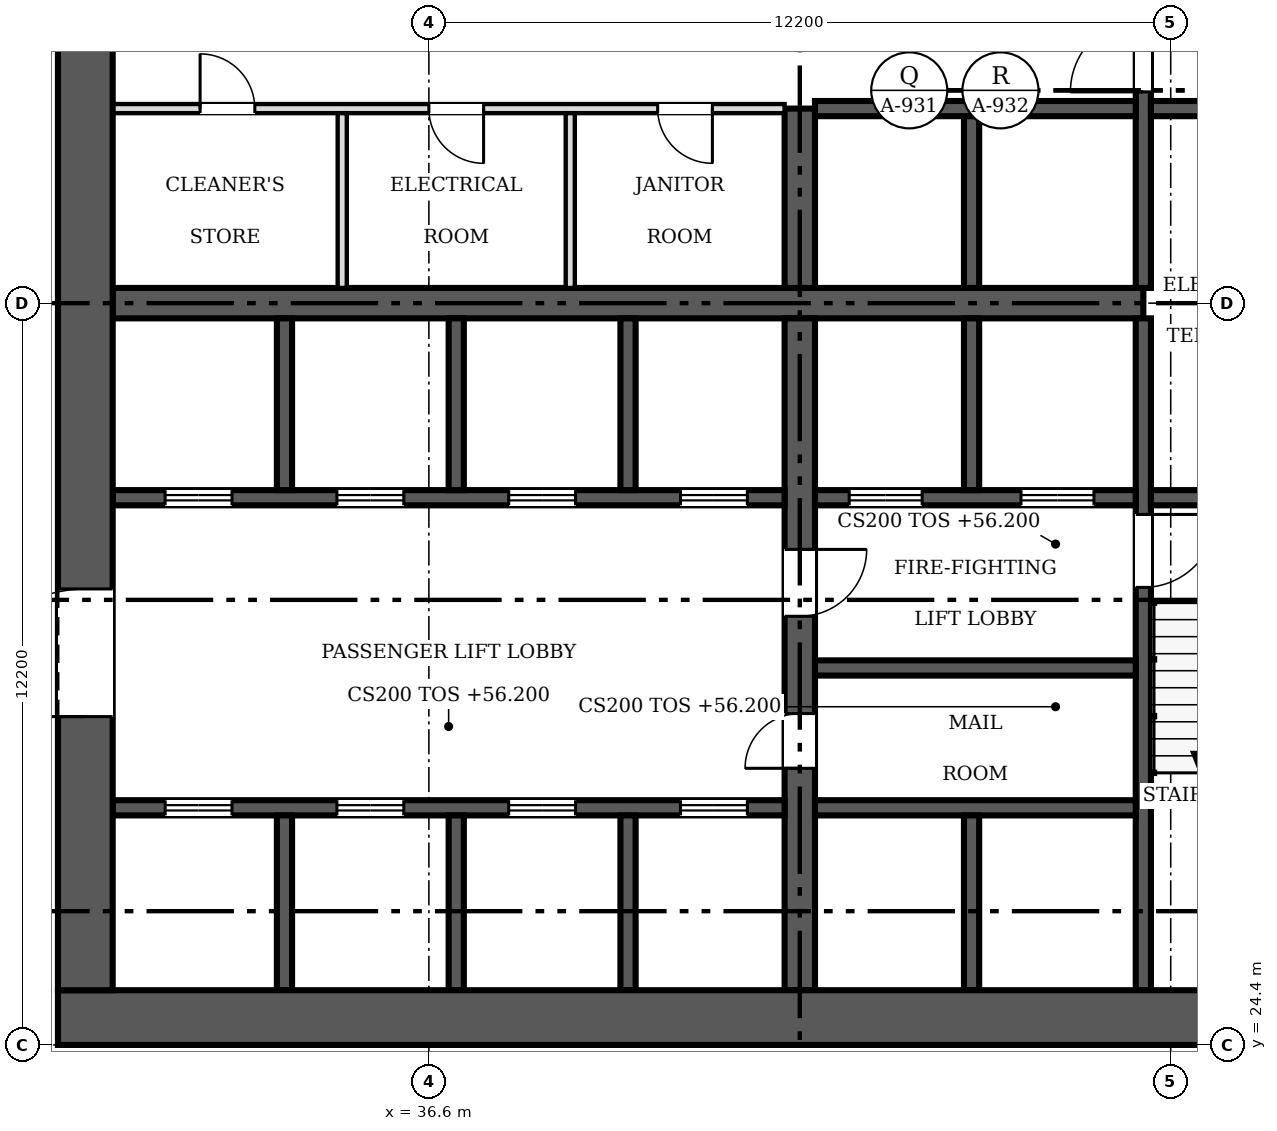
"""IFC4 building model, lengths in metres.
Left out: names, types, materials, properties, quantities, classifications, styles, units other than length and angle.
Written with IfcOpenShell. Run it as: python <this file> out.ifc"""

import sys

from ifc_helpers import new_model, si_unit, direction, frame, frame_2d, origin, place, context, subcontext, project, spatial, rectangle, extrude, source, transform, mapped, element, fill, save


model = new_model("IFC4")
c1 = context("Model", 3, precision=1e-05, world=origin(), true_north=direction((0.0, 1.0)))
c2 = subcontext(c1, "Body", "Model", "MODEL_VIEW")
j1 = project(units=[si_unit("LENGTHUNIT", "METRE"), si_unit("PLANEANGLEUNIT", "RADIAN")], contexts=[c1])
p1 = place(None, origin())
s1 = spatial("IfcSite", under=j1, at=p1, CompositionType="ELEMENT")
p2 = place(p1, origin())
s2 = spatial("IfcBuilding", under=s1, at=p2, CompositionType="ELEMENT")
p3 = place(p2, frame((0.0, 0.0, 56.2)))
s3 = spatial("IfcBuildingStorey", under=s2, at=p3, CompositionType="ELEMENT", Elevation=56.2)
p4 = place(p3, frame((54.9, 24.85, 0.0), z_axis=(0.0, 0.0, 1.0), x_axis=(-1.0, 0.0, 0.0)))
e1 = element("IfcWall", 1, at=p4, inside=s3, PredefinedType="SHEAR", context=c2, shape_type="SweptSolid", body=[
    extrude(rectangle(XDim=24.4, YDim=0.9, at=frame_2d((12.2, 0.0))), origin(), (0.0, 0.0, 1.0), 3.8),
])
m1 = source(origin(), c2, "Body", "SweptSolid", [
    extrude(rectangle(XDim=1.2, YDim=2.1, at=frame_2d((0.6, 1.05))), frame((0.0, 0.46, 0.0), z_axis=(0.0, -1.0, 0.0), x_axis=(1.0, 0.0, 0.0)), (0.0, 0.0, 1.0), 0.92),
])
p5 = place(p4, frame((1.5, 0.0, 0.0)))
e2 = element("IfcOpeningElement", 2, at=p5, cuts=e1, PredefinedType="OPENING", context=c2, shape_type="MappedRepresentation", body=[
    mapped(m1, transform((0.0, 0.0, 0.0), scale=1.0)),
])
p6 = place(p3, frame((30.95, 25.3, 0.0), z_axis=(0.0, 0.0, 1.0), x_axis=(0.0, 1.0, 0.0)))
e3 = element("IfcWall", 3, at=p6, inside=s3, PredefinedType="SHEAR", context=c2, shape_type="SweptSolid", body=[
    extrude(rectangle(XDim=22.6, YDim=0.9, at=frame_2d((11.3, 0.0))), origin(), (0.0, 0.0, 1.0), 3.8),
])
m2 = source(origin(), c2, "Body", "SweptSolid", [
    extrude(rectangle(XDim=2.1, YDim=2.4, at=frame_2d((1.05, 1.2))), frame((0.0, 0.46, 0.0), z_axis=(0.0, -1.0, 0.0), x_axis=(1.0, 0.0, 0.0)), (0.0, 0.0, 1.0), 0.92),
])
p7 = place(p6, frame((4.5, 0.0, 0.0)))
e4 = element("IfcOpeningElement", 4, at=p7, cuts=e3, PredefinedType="OPENING", context=c2, shape_type="MappedRepresentation", body=[
    mapped(m2, transform((0.0, 0.0, 0.0), scale=1.0)),
])
p8 = place(p6, frame((16.0, 0.0, 0.0)))
e5 = element("IfcOpeningElement", 5, at=p8, cuts=e3, PredefinedType="OPENING", context=c2, shape_type="MappedRepresentation", body=[
    mapped(m2, transform((0.0, 0.0, 0.0), scale=1.0)),
])
p9 = place(p3, frame((31.4, 36.6, 0.0), z_axis=(0.0, 0.0, 1.0), x_axis=(1.0, 0.0, 0.0)))
e6 = element("IfcWall", 6, at=p9, inside=s3, PredefinedType="SHEAR", context=c2, shape_type="SweptSolid", body=[
    extrude(rectangle(XDim=16.95, YDim=0.5, at=frame_2d((8.475, 0.0))), origin(), (0.0, 0.0, 1.0), 3.8),
])
p10 = place(p3, frame((42.7, 36.35, 0.0), z_axis=(0.0, 0.0, 1.0), x_axis=(0.0, -1.0, 0.0)))
e7 = element("IfcWall", 7, at=p10, inside=s3, PredefinedType="SHEAR", context=c2, shape_type="SweptSolid", body=[
    extrude(rectangle(XDim=11.05, YDim=0.5, at=frame_2d((5.525, 0.0))), origin(), (0.0, 0.0, 1.0), 3.8),
])
m3 = source(origin(), c2, "Body", "SweptSolid", [
    extrude(rectangle(XDim=0.9, YDim=2.1, at=frame_2d((0.45, 1.05))), frame((0.0, 0.26, 0.0), z_axis=(0.0, -1.0, 0.0), x_axis=(1.0, 0.0, 0.0)), (0.0, 0.0, 1.0), 0.52),
])
p11 = place(p10, frame((6.5, 0.0, 0.0)))
e8 = element("IfcOpeningElement", 8, at=p11, cuts=e7, PredefinedType="OPENING", context=c2, shape_type="MappedRepresentation", body=[
    mapped(m3, transform((0.0, 0.0, 0.0), scale=1.0)),
])
m4 = source(origin(), c2, "Body", "SweptSolid", [
    extrude(rectangle(XDim=1.1, YDim=2.1, at=frame_2d((0.55, 1.05))), frame((0.0, 0.26, 0.0), z_axis=(0.0, -1.0, 0.0), x_axis=(1.0, 0.0, 0.0)), (0.0, 0.0, 1.0), 0.52),
])
p12 = place(p10, frame((3.8, 0.0, 0.0)))
e9 = element("IfcOpeningElement", 9, at=p12, cuts=e7, PredefinedType="OPENING", context=c2, shape_type="MappedRepresentation", body=[
    mapped(m4, transform((0.0, 0.0, 0.0), scale=1.0)),
])
p13 = place(p3, frame((42.7, 36.85, 0.0), z_axis=(0.0, 0.0, 1.0), x_axis=(0.0, 1.0, 0.0)))
e10 = element("IfcWall", 10, at=p13, inside=s3, PredefinedType="SHEAR", context=c2, shape_type="SweptSolid", body=[
    extrude(rectangle(XDim=2.95, YDim=0.5, at=frame_2d((1.475, 0.0))), origin(), (0.0, 0.0, 1.0), 3.8),
])
p14 = place(p3, frame((48.35, 36.35, 0.0), z_axis=(0.0, 0.0, 1.0), x_axis=(0.0, -1.0, 0.0)))
e11 = element("IfcWall", 11, at=p14, inside=s3, PredefinedType="SOLIDWALL", context=c2, shape_type="SweptSolid", body=[
    extrude(rectangle(XDim=11.05, YDim=0.25, at=frame_2d((5.525, 0.0))), origin(), (0.0, 0.0, 1.0), 3.8),
])
m5 = source(origin(), c2, "Body", "SweptSolid", [
    extrude(rectangle(XDim=1.2, YDim=2.1, at=frame_2d((0.6, 1.05))), frame((0.0, 0.135, 0.0), z_axis=(0.0, -1.0, 0.0), x_axis=(1.0, 0.0, 0.0)), (0.0, 0.0, 1.0), 0.27),
])
p15 = place(p14, frame((3.225, 0.0, 0.0)))
e12 = element("IfcOpeningElement", 12, at=p15, cuts=e11, PredefinedType="OPENING", context=c2, shape_type="MappedRepresentation", body=[
    mapped(m5, transform((0.0, 0.0, 0.0), scale=1.0)),
])
p16 = place(p3, frame((48.35, 47.9, 0.0), z_axis=(0.0, 0.0, 1.0), x_axis=(0.0, -1.0, 0.0)))
e13 = element("IfcWall", 13, at=p16, inside=s3, PredefinedType="SOLIDWALL", context=c2, shape_type="SweptSolid", body=[
    extrude(rectangle(XDim=11.05, YDim=0.25, at=frame_2d((5.525, 0.0))), origin(), (0.0, 0.0, 1.0), 3.8),
])
p17 = place(p16, frame((6.625, 0.0, 0.0)))
e14 = element("IfcOpeningElement", 14, at=p17, cuts=e13, PredefinedType="OPENING", context=c2, shape_type="MappedRepresentation", body=[
    mapped(m5, transform((0.0, 0.0, 0.0), scale=1.0)),
])
p18 = place(p3, frame((42.45, 33.4, 0.0), z_axis=(0.0, 0.0, 1.0), x_axis=(-1.0, 0.0, 0.0)))
e15 = element("IfcWall", 15, at=p18, inside=s3, PredefinedType="SOLIDWALL", context=c2, shape_type="SweptSolid", body=[
    extrude(rectangle(XDim=11.05, YDim=0.25, at=frame_2d((5.525, 0.0))), origin(), (0.0, 0.0, 1.0), 3.8),
])
m6 = source(origin(), c2, "Body", "SweptSolid", [
    extrude(rectangle(XDim=1.1, YDim=2.1, at=frame_2d((0.55, 1.05))), frame((0.0, 0.135, 0.0), z_axis=(0.0, -1.0, 0.0), x_axis=(1.0, 0.0, 0.0)), (0.0, 0.0, 1.0), 0.27),
])
p19 = place(p18, frame((9.087, 0.0, 0.0)))
e16 = element("IfcOpeningElement", 16, at=p19, cuts=e15, PredefinedType="OPENING", context=c2, shape_type="MappedRepresentation", body=[
    mapped(m6, transform((0.0, 0.0, 0.0), scale=1.0)),
])
p20 = place(p18, frame((6.262, 0.0, 0.0)))
e17 = element("IfcOpeningElement", 17, at=p20, cuts=e15, PredefinedType="OPENING", context=c2, shape_type="MappedRepresentation", body=[
    mapped(m6, transform((0.0, 0.0, 0.0), scale=1.0)),
])
p21 = place(p18, frame((3.438, 0.0, 0.0)))
e18 = element("IfcOpeningElement", 18, at=p21, cuts=e15, PredefinedType="OPENING", context=c2, shape_type="MappedRepresentation", body=[
    mapped(m6, transform((0.0, 0.0, 0.0), scale=1.0)),
])
p22 = place(p18, frame((0.613, 0.0, 0.0)))
e19 = element("IfcOpeningElement", 19, at=p22, cuts=e15, PredefinedType="OPENING", context=c2, shape_type="MappedRepresentation", body=[
    mapped(m6, transform((0.0, 0.0, 0.0), scale=1.0)),
])
p23 = place(p3, frame((48.225, 33.4, 0.0), z_axis=(0.0, 0.0, 1.0), x_axis=(-1.0, 0.0, 0.0)))
e20 = element("IfcWall", 20, at=p23, inside=s3, PredefinedType="SOLIDWALL", context=c2, shape_type="SweptSolid", body=[
    extrude(rectangle(XDim=5.275, YDim=0.25, at=frame_2d((2.638, 0.0))), origin(), (0.0, 0.0, 1.0), 3.8),
])
p24 = place(p23, frame((3.512, 0.0, 0.0)))
e21 = element("IfcOpeningElement", 21, at=p24, cuts=e20, PredefinedType="OPENING", context=c2, shape_type="MappedRepresentation", body=[
    mapped(m5, transform((0.0, 0.0, 0.0), scale=1.0)),
])
p25 = place(p23, frame((0.688, 0.0, 0.0)))
e22 = element("IfcOpeningElement", 22, at=p25, cuts=e20, PredefinedType="OPENING", context=c2, shape_type="MappedRepresentation", body=[
    mapped(m5, transform((0.0, 0.0, 0.0), scale=1.0)),
])
p26 = place(p3, frame((48.475, 33.4, 0.0), z_axis=(0.0, 0.0, 1.0), x_axis=(1.0, 0.0, 0.0)))
e23 = element("IfcWall", 23, at=p26, inside=s3, PredefinedType="SOLIDWALL", context=c2, shape_type="SweptSolid", body=[
    extrude(rectangle(XDim=3.525, YDim=0.25, at=frame_2d((1.762, 0.0))), origin(), (0.0, 0.0, 1.0), 3.8),
])
p27 = place(p3, frame((31.4, 28.3, 0.0), z_axis=(0.0, 0.0, 1.0), x_axis=(1.0, 0.0, 0.0)))
e24 = element("IfcWall", 24, at=p27, inside=s3, PredefinedType="SOLIDWALL", context=c2, shape_type="SweptSolid", body=[
    extrude(rectangle(XDim=11.05, YDim=0.25, at=frame_2d((5.525, 0.0))), origin(), (0.0, 0.0, 1.0), 3.8),
])
p28 = place(p27, frame((0.863, 0.0, 0.0)))
e25 = element("IfcOpeningElement", 25, at=p28, cuts=e24, PredefinedType="OPENING", context=c2, shape_type="MappedRepresentation", body=[
    mapped(m6, transform((0.0, 0.0, 0.0), scale=1.0)),
])
p29 = place(p27, frame((3.688, 0.0, 0.0)))
e26 = element("IfcOpeningElement", 26, at=p29, cuts=e24, PredefinedType="OPENING", context=c2, shape_type="MappedRepresentation", body=[
    mapped(m6, transform((0.0, 0.0, 0.0), scale=1.0)),
])
p30 = place(p27, frame((6.512, 0.0, 0.0)))
e27 = element("IfcOpeningElement", 27, at=p30, cuts=e24, PredefinedType="OPENING", context=c2, shape_type="MappedRepresentation", body=[
    mapped(m6, transform((0.0, 0.0, 0.0), scale=1.0)),
])
p31 = place(p27, frame((9.337, 0.0, 0.0)))
e28 = element("IfcOpeningElement", 28, at=p31, cuts=e24, PredefinedType="OPENING", context=c2, shape_type="MappedRepresentation", body=[
    mapped(m6, transform((0.0, 0.0, 0.0), scale=1.0)),
])
for number, where, z_axis, x_axis in (
    (29, (42.95, 28.3, 0.0), (0.0, 0.0, 1.0), (1.0, 0.0, 0.0)),
    (30, (42.95, 39.8, 0.0), (0.0, 0.0, 1.0), (1.0, 0.0, 0.0)),
):
    element("IfcWall", number, at=place(p3, frame(where, z_axis=z_axis, x_axis=x_axis)), inside=s3, PredefinedType="SOLIDWALL", context=c2, shape_type="SweptSolid", body=[
        extrude(rectangle(XDim=5.275, YDim=0.25, at=frame_2d((2.638, 0.0))), origin(), (0.0, 0.0, 1.0), 3.8),
    ])
p32 = place(p3, frame((48.475, 39.8, 0.0), z_axis=(0.0, 0.0, 1.0), x_axis=(1.0, 0.0, 0.0)))
e31 = element("IfcWall", 31, at=p32, inside=s3, PredefinedType="SOLIDWALL", context=c2, shape_type="SweptSolid", body=[
    extrude(rectangle(XDim=3.525, YDim=0.25, at=frame_2d((1.762, 0.0))), origin(), (0.0, 0.0, 1.0), 3.8),
])
p33 = place(p3, frame((45.525, 33.525, 0.0), z_axis=(0.0, 0.0, 1.0), x_axis=(0.0, 1.0, 0.0)))
e32 = element("IfcWall", 32, at=p33, inside=s3, PredefinedType="SOLIDWALL", context=c2, shape_type="SweptSolid", body=[
    extrude(rectangle(XDim=2.825, YDim=0.25, at=frame_2d((1.413, 0.0))), origin(), (0.0, 0.0, 1.0), 3.8),
])
p34 = place(p3, frame((45.525, 36.85, 0.0), z_axis=(0.0, 0.0, 1.0), x_axis=(0.0, 1.0, 0.0)))
e33 = element("IfcWall", 33, at=p34, inside=s3, PredefinedType="SOLIDWALL", context=c2, shape_type="SweptSolid", body=[
    extrude(rectangle(XDim=2.825, YDim=0.25, at=frame_2d((1.413, 0.0))), origin(), (0.0, 0.0, 1.0), 3.8),
])
p35 = place(p3, frame((42.95, 30.6, 0.0), z_axis=(0.0, 0.0, 1.0), x_axis=(1.0, 0.0, 0.0)))
e34 = element("IfcWall", 34, at=p35, inside=s3, PredefinedType="SOLIDWALL", context=c2, shape_type="SweptSolid", body=[
    extrude(rectangle(XDim=5.275, YDim=0.25, at=frame_2d((2.638, 0.0))), origin(), (0.0, 0.0, 1.0), 3.8),
])
for number, where, z_axis, x_axis in (
    (35, (34.225, 33.525, 0.0), (0.0, 0.0, 1.0), (0.0, 1.0, 0.0)),
    (36, (37.05, 33.525, 0.0), (0.0, 0.0, 1.0), (0.0, 1.0, 0.0)),
    (37, (39.875, 33.525, 0.0), (0.0, 0.0, 1.0), (0.0, 1.0, 0.0)),
):
    element("IfcWall", number, at=place(p3, frame(where, z_axis=z_axis, x_axis=x_axis)), inside=s3, PredefinedType="SOLIDWALL", context=c2, shape_type="SweptSolid", body=[
        extrude(rectangle(XDim=2.825, YDim=0.25, at=frame_2d((1.413, 0.0))), origin(), (0.0, 0.0, 1.0), 3.8),
    ])
for number, where, z_axis, x_axis in (
    (38, (34.225, 25.3, 0.0), (0.0, 0.0, 1.0), (0.0, 1.0, 0.0)),
    (39, (37.05, 25.3, 0.0), (0.0, 0.0, 1.0), (0.0, 1.0, 0.0)),
    (40, (39.875, 25.3, 0.0), (0.0, 0.0, 1.0), (0.0, 1.0, 0.0)),
    (41, (45.525, 25.3, 0.0), (0.0, 0.0, 1.0), (0.0, 1.0, 0.0)),
):
    element("IfcWall", number, at=place(p3, frame(where, z_axis=z_axis, x_axis=x_axis)), inside=s3, PredefinedType="SOLIDWALL", context=c2, shape_type="SweptSolid", body=[
        extrude(rectangle(XDim=2.875, YDim=0.25, at=frame_2d((1.438, 0.0))), origin(), (0.0, 0.0, 1.0), 3.8),
    ])
p36 = place(p3, frame((42.45, 39.8, 0.0), z_axis=(0.0, 0.0, 1.0), x_axis=(-1.0, 0.0, 0.0)))
e42 = element("IfcWall", 42, at=p36, inside=s3, PredefinedType="PARTITIONING", context=c2, shape_type="SweptSolid", body=[
    extrude(rectangle(XDim=11.05, YDim=0.15, at=frame_2d((5.525, 0.0))), origin(), (0.0, 0.0, 1.0), 3.6),
])
m7 = source(origin(), c2, "Body", "SweptSolid", [
    extrude(rectangle(XDim=0.9, YDim=2.1, at=frame_2d((0.45, 1.05))), frame((0.0, 0.085, 0.0), z_axis=(0.0, -1.0, 0.0), x_axis=(1.0, 0.0, 0.0)), (0.0, 0.0, 1.0), 0.17),
])
p37 = place(p36, frame((8.712, 0.0, 0.0)))
e43 = element("IfcOpeningElement", 43, at=p37, cuts=e42, PredefinedType="OPENING", context=c2, shape_type="MappedRepresentation", body=[
    mapped(m7, transform((0.0, 0.0, 0.0), scale=1.0)),
])
p38 = place(p36, frame((4.95, 0.0, 0.0)))
e44 = element("IfcOpeningElement", 44, at=p38, cuts=e42, PredefinedType="OPENING", context=c2, shape_type="MappedRepresentation", body=[
    mapped(m7, transform((0.0, 0.0, 0.0), scale=1.0)),
])
p39 = place(p36, frame((1.188, 0.0, 0.0)))
e45 = element("IfcOpeningElement", 45, at=p39, cuts=e42, PredefinedType="OPENING", context=c2, shape_type="MappedRepresentation", body=[
    mapped(m7, transform((0.0, 0.0, 0.0), scale=1.0)),
])
for number, where, z_axis, x_axis in (
    (46, (35.175, 36.85, 0.0), (0.0, 0.0, 1.0), (0.0, 1.0, 0.0)),
    (47, (38.925, 36.85, 0.0), (0.0, 0.0, 1.0), (0.0, 1.0, 0.0)),
):
    element("IfcWall", number, at=place(p3, frame(where, z_axis=z_axis, x_axis=x_axis)), inside=s3, PredefinedType="PARTITIONING", context=c2, shape_type="SweptSolid", body=[
        extrude(rectangle(XDim=2.875, YDim=0.15, at=frame_2d((1.438, 0.0))), origin(), (0.0, 0.0, 1.0), 3.6),
    ])
m8 = source(origin(), c2, "Body", "SweptSolid", [
    extrude(rectangle(XDim=2.1, YDim=2.4, at=frame_2d((1.05, 1.2))), frame((0.0, 0.025, 0.0), z_axis=(0.0, -1.0, 0.0), x_axis=(1.0, 0.0, 0.0)), (0.0, 0.0, 1.0), 0.05),
])
p40 = place(p7, origin())
e48 = element("IfcDoor", 48, at=p40, inside=s3, OperationType="DOUBLE_DOOR_SINGLE_SWING", PredefinedType="DOOR", context=c2, shape_type="MappedRepresentation", body=[
    mapped(m8, transform((0.0, 0.0, 0.0), scale=1.0)),
])
fill(e4, e48)
m9 = source(origin(), c2, "Body", "SweptSolid", [
    extrude(rectangle(XDim=0.9, YDim=2.1, at=frame_2d((0.45, 1.05))), frame((0.0, 0.025, 0.0), z_axis=(0.0, -1.0, 0.0), x_axis=(1.0, 0.0, 0.0)), (0.0, 0.0, 1.0), 0.05),
])
p41 = place(p11, origin())
e49 = element("IfcDoor", 49, at=p41, inside=s3, OperationType="SINGLE_SWING_RIGHT", PredefinedType="DOOR", context=c2, shape_type="MappedRepresentation", body=[
    mapped(m9, transform((0.0, 0.0, 0.0), scale=1.0)),
])
fill(e8, e49)
m10 = source(origin(), c2, "Body", "SweptSolid", [
    extrude(rectangle(XDim=1.1, YDim=2.1, at=frame_2d((0.55, 1.05))), frame((0.0, 0.025, 0.0), z_axis=(0.0, -1.0, 0.0), x_axis=(1.0, 0.0, 0.0)), (0.0, 0.0, 1.0), 0.05),
])
p42 = place(p12, origin())
e50 = element("IfcDoor", 50, at=p42, inside=s3, OperationType="SINGLE_SWING_LEFT", PredefinedType="DOOR", context=c2, shape_type="MappedRepresentation", body=[
    mapped(m10, transform((0.0, 0.0, 0.0), scale=1.0)),
])
fill(e9, e50)
m11 = source(origin(), c2, "Body", "SweptSolid", [
    extrude(rectangle(XDim=1.2, YDim=2.1, at=frame_2d((0.6, 1.05))), frame((0.0, 0.025, 0.0), z_axis=(0.0, -1.0, 0.0), x_axis=(1.0, 0.0, 0.0)), (0.0, 0.0, 1.0), 0.05),
])
p43 = place(p15, origin())
e51 = element("IfcDoor", 51, at=p43, inside=s3, OperationType="SINGLE_SWING_LEFT", PredefinedType="DOOR", context=c2, shape_type="MappedRepresentation", body=[
    mapped(m11, transform((0.0, 0.0, 0.0), scale=1.0)),
])
fill(e12, e51)
p44 = place(p17, origin())
e52 = element("IfcDoor", 52, at=p44, inside=s3, OperationType="SINGLE_SWING_RIGHT", PredefinedType="DOOR", context=c2, shape_type="MappedRepresentation", body=[
    mapped(m11, transform((0.0, 0.0, 0.0), scale=1.0)),
])
fill(e14, e52)
p45 = place(p19, origin())
e53 = element("IfcDoor", 53, at=p45, inside=s3, OperationType="DOUBLE_DOOR_SLIDING", PredefinedType="DOOR", context=c2, shape_type="MappedRepresentation", body=[
    mapped(m10, transform((0.0, 0.0, 0.0), scale=1.0)),
])
fill(e16, e53)
p46 = place(p20, origin())
e54 = element("IfcDoor", 54, at=p46, inside=s3, OperationType="DOUBLE_DOOR_SLIDING", PredefinedType="DOOR", context=c2, shape_type="MappedRepresentation", body=[
    mapped(m10, transform((0.0, 0.0, 0.0), scale=1.0)),
])
fill(e17, e54)
p47 = place(p21, origin())
e55 = element("IfcDoor", 55, at=p47, inside=s3, OperationType="DOUBLE_DOOR_SLIDING", PredefinedType="DOOR", context=c2, shape_type="MappedRepresentation", body=[
    mapped(m10, transform((0.0, 0.0, 0.0), scale=1.0)),
])
fill(e18, e55)
p48 = place(p22, origin())
e56 = element("IfcDoor", 56, at=p48, inside=s3, OperationType="DOUBLE_DOOR_SLIDING", PredefinedType="DOOR", context=c2, shape_type="MappedRepresentation", body=[
    mapped(m10, transform((0.0, 0.0, 0.0), scale=1.0)),
])
fill(e19, e56)
p49 = place(p24, origin())
e57 = element("IfcDoor", 57, at=p49, inside=s3, OperationType="DOUBLE_DOOR_SLIDING", PredefinedType="DOOR", context=c2, shape_type="MappedRepresentation", body=[
    mapped(m11, transform((0.0, 0.0, 0.0), scale=1.0)),
])
fill(e21, e57)
p50 = place(p25, origin())
e58 = element("IfcDoor", 58, at=p50, inside=s3, OperationType="DOUBLE_DOOR_SLIDING", PredefinedType="DOOR", context=c2, shape_type="MappedRepresentation", body=[
    mapped(m11, transform((0.0, 0.0, 0.0), scale=1.0)),
])
fill(e22, e58)
p51 = place(p28, origin())
e59 = element("IfcDoor", 59, at=p51, inside=s3, OperationType="DOUBLE_DOOR_SLIDING", PredefinedType="DOOR", context=c2, shape_type="MappedRepresentation", body=[
    mapped(m10, transform((0.0, 0.0, 0.0), scale=1.0)),
])
fill(e25, e59)
p52 = place(p29, origin())
e60 = element("IfcDoor", 60, at=p52, inside=s3, OperationType="DOUBLE_DOOR_SLIDING", PredefinedType="DOOR", context=c2, shape_type="MappedRepresentation", body=[
    mapped(m10, transform((0.0, 0.0, 0.0), scale=1.0)),
])
fill(e26, e60)
p53 = place(p30, origin())
e61 = element("IfcDoor", 61, at=p53, inside=s3, OperationType="DOUBLE_DOOR_SLIDING", PredefinedType="DOOR", context=c2, shape_type="MappedRepresentation", body=[
    mapped(m10, transform((0.0, 0.0, 0.0), scale=1.0)),
])
fill(e27, e61)
p54 = place(p31, origin())
e62 = element("IfcDoor", 62, at=p54, inside=s3, OperationType="DOUBLE_DOOR_SLIDING", PredefinedType="DOOR", context=c2, shape_type="MappedRepresentation", body=[
    mapped(m10, transform((0.0, 0.0, 0.0), scale=1.0)),
])
fill(e28, e62)
p55 = place(p37, origin())
e63 = element("IfcDoor", 63, at=p55, inside=s3, OperationType="SINGLE_SWING_RIGHT", PredefinedType="DOOR", context=c2, shape_type="MappedRepresentation", body=[
    mapped(m9, transform((0.0, 0.0, 0.0), scale=1.0)),
])
fill(e43, e63)
p56 = place(p38, origin())
e64 = element("IfcDoor", 64, at=p56, inside=s3, OperationType="SINGLE_SWING_LEFT", PredefinedType="DOOR", context=c2, shape_type="MappedRepresentation", body=[
    mapped(m9, transform((0.0, 0.0, 0.0), scale=1.0)),
])
fill(e44, e64)
p57 = place(p39, origin())
e65 = element("IfcDoor", 65, at=p57, inside=s3, OperationType="SINGLE_SWING_LEFT", PredefinedType="DOOR", context=c2, shape_type="MappedRepresentation", body=[
    mapped(m9, transform((0.0, 0.0, 0.0), scale=1.0)),
])
fill(e45, e65)
save(model, sys.argv[1])
